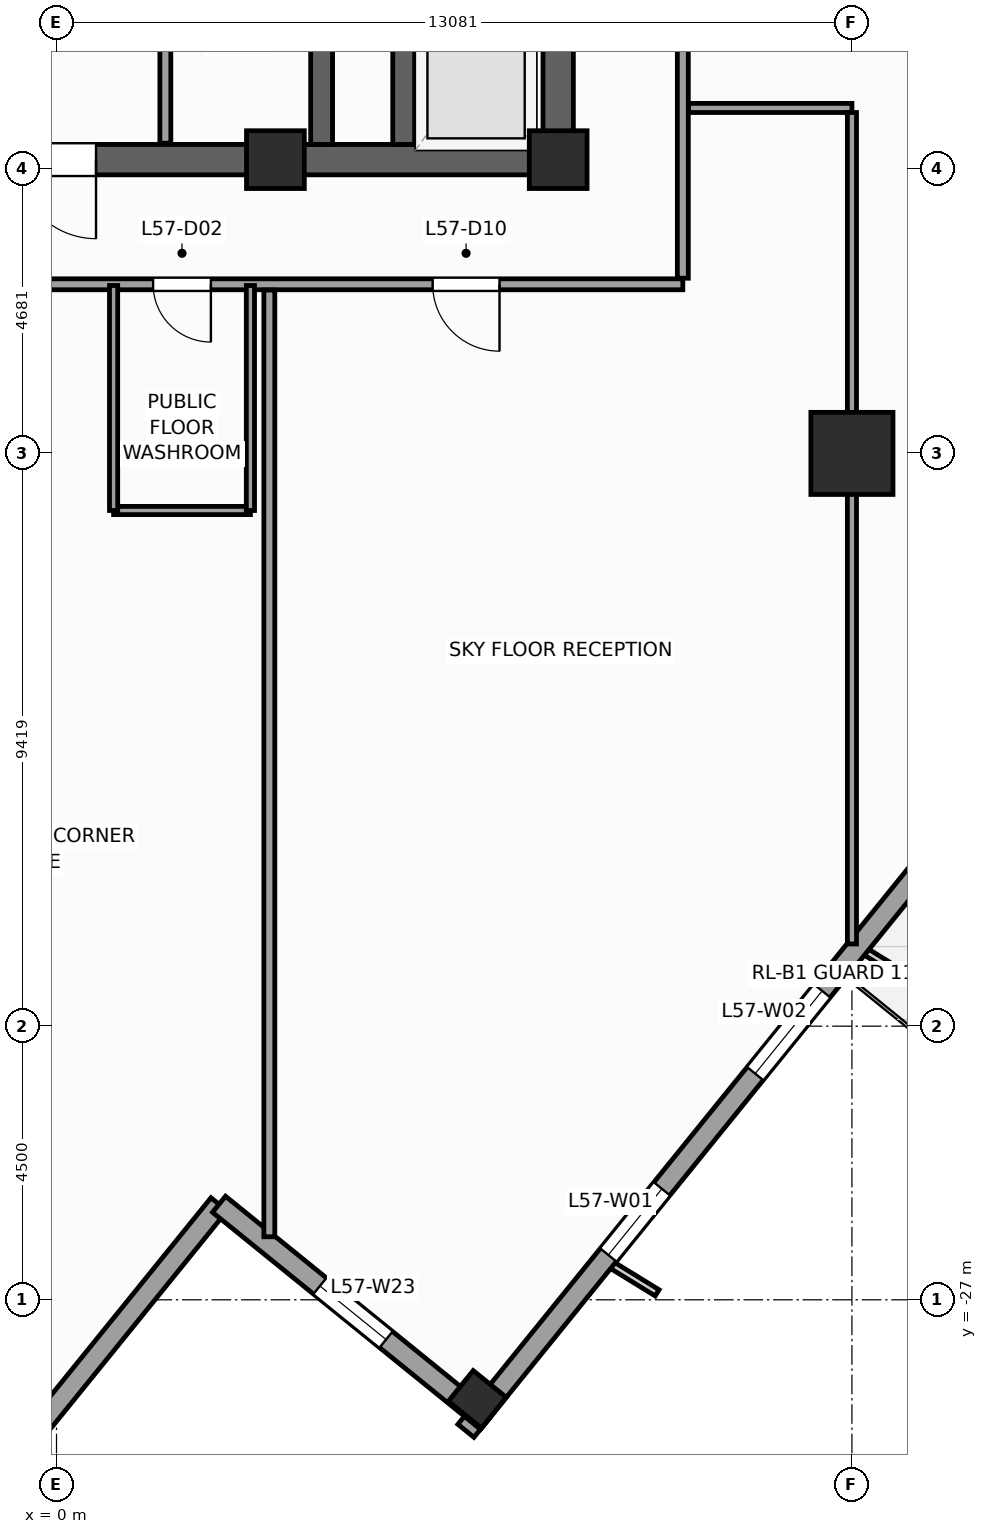
"""IFC4 building model, lengths in metres.
Left out: names, types, materials, properties, quantities, classifications, styles, units other than length and angle.
Written with IfcOpenShell. Run it as: python <this file> out.ifc"""

import sys

from ifc_helpers import new_model, si_unit, direction, frame, frame_2d, origin, origin_2d, place, context, subcontext, project, spatial, rectangle, extrude, source, transform, mapped, element, fill, save


model = new_model("IFC4")
c1 = context("Model", 3, precision=1e-05, world=origin(), true_north=direction((0.0, 1.0)))
c2 = subcontext(c1, "Body", "Model", "MODEL_VIEW")
j1 = project(units=[si_unit("LENGTHUNIT", "METRE"), si_unit("PLANEANGLEUNIT", "RADIAN")], contexts=[c1])
p1 = place(None, origin())
s1 = spatial("IfcSite", under=j1, at=p1, CompositionType="ELEMENT")
p2 = place(p1, origin())
s2 = spatial("IfcBuilding", under=s1, at=p2, CompositionType="ELEMENT")
p3 = place(p2, frame((0.0, 0.0, 236.8)))
s3 = spatial("IfcBuildingStorey", under=s2, at=p3, CompositionType="ELEMENT", Elevation=236.8)
p4 = place(p3, frame((-8.5, -8.25, 0.0), z_axis=(0.0, 0.0, 1.0), x_axis=(1.0, 0.0, 0.0)))
e1 = element("IfcWall", 1, at=p4, inside=s3, PredefinedType="SHEAR", context=c2, shape_type="SweptSolid", body=[
    extrude(rectangle(XDim=17.0, YDim=0.5, at=frame_2d((8.5, 0.0))), origin(), (0.0, 0.0, 1.0), 3.9),
])
p5 = place(p4, frame((7.85, 0.0, 0.0)))
e2 = element("IfcOpeningElement", 2, at=p5, cuts=e1, PredefinedType="OPENING", context=c2, shape_type="SweptSolid", body=[
    extrude(rectangle(XDim=1.3, YDim=2.2, at=frame_2d((0.65, 1.1))), frame((0.0, 0.26, 0.0), z_axis=(0.0, -1.0, 0.0), x_axis=(1.0, 0.0, 0.0)), (0.0, 0.0, 1.0), 0.52),
])
p6 = place(p3, frame((8.25, -8.0, 0.0), z_axis=(0.0, 0.0, 1.0), x_axis=(0.0, 1.0, 0.0)))
e3 = element("IfcWall", 3, at=p6, inside=s3, PredefinedType="SHEAR", context=c2, shape_type="SweptSolid", body=[
    extrude(rectangle(XDim=16.0, YDim=0.5, at=frame_2d((8.0, 0.0))), origin(), (0.0, 0.0, 1.0), 3.9),
])
p7 = place(p6, frame((4.69, 0.0, 0.0)))
e4 = element("IfcOpeningElement", 4, at=p7, cuts=e3, PredefinedType="OPENING", context=c2, shape_type="SweptSolid", body=[
    extrude(rectangle(XDim=1.3, YDim=2.2, at=frame_2d((0.65, 1.1))), frame((0.0, 0.26, 0.0), z_axis=(0.0, -1.0, 0.0), x_axis=(1.0, 0.0, 0.0)), (0.0, 0.0, 1.0), 0.52),
])
p8 = place(p3, frame((4.36, -8.0, 0.0), z_axis=(0.0, 0.0, 1.0), x_axis=(0.0, 1.0, 0.0)))
e5 = element("IfcWall", 5, at=p8, inside=s3, PredefinedType="SHEAR", context=c2, shape_type="SweptSolid", body=[
    extrude(rectangle(XDim=16.0, YDim=0.36, at=frame_2d((8.0, 0.0))), origin(), (0.0, 0.0, 1.0), 3.9),
])
p9 = place(p3, frame((5.71, -8.0, 0.0), z_axis=(0.0, 0.0, 1.0), x_axis=(0.0, 1.0, 0.0)))
e6 = element("IfcWall", 6, at=p9, inside=s3, PredefinedType="SHEAR", context=c2, shape_type="SweptSolid", body=[
    extrude(rectangle(XDim=2.54, YDim=0.36, at=frame_2d((1.27, 0.0))), origin(), (0.0, 0.0, 1.0), 3.9),
])
m1 = source(origin(), c2, "Body", "SweptSolid", [
    extrude(rectangle(XDim=0.95, YDim=0.95, at=origin_2d()), origin(), (0.0, 0.0, 1.0), 3.9),
])
for number, where, z_axis, x_axis in (
    (7, (8.25, -8.25, 0.0), (0.0, 0.0, 1.0), (1.0, 0.0, 0.0)),
    (8, (3.6, -8.25, 0.0), (0.0, 0.0, 1.0), (1.0, 0.0, 0.0)),
):
    element("IfcColumn", number, at=place(p3, frame(where, z_axis=z_axis, x_axis=x_axis)), inside=s3, PredefinedType="PILASTER", context=c2, shape_type="MappedRepresentation", body=[
        mapped(m1, transform((0.0, 0.0, 0.0), scale=1.0)),
    ])
m2 = source(origin(), c2, "Body", "SweptSolid", [
    extrude(rectangle(XDim=1.35, YDim=1.35, at=origin_2d()), origin(), (0.0, 0.0, 1.0), 3.9),
])
p10 = place(p3, frame((13.081, -13.081, 0.0), z_axis=(0.0, 0.0, 1.0), x_axis=(1.0, 0.0, 0.0)))
e9 = element("IfcColumn", 9, at=p10, inside=s3, PredefinedType="COLUMN", context=c2, shape_type="MappedRepresentation", body=[
    mapped(m2, transform((0.0, 0.0, 0.0), scale=1.0)),
])
m3 = source(origin(), c2, "Body", "SweptSolid", [
    extrude(rectangle(XDim=0.65, YDim=0.7, at=origin_2d()), origin(), (0.0, 0.0, 1.0), 3.9),
])
p11 = place(p3, frame((6.92, -28.637, 0.0), z_axis=(0.0, 0.0, 1.0), x_axis=(0.62932039105, 0.777145961457, 0.0)))
e10 = element("IfcColumn", 10, at=p11, inside=s3, PredefinedType="COLUMN", context=c2, shape_type="MappedRepresentation", body=[
    mapped(m3, transform((0.0, 0.0, 0.0), scale=1.0)),
])
p12 = place(p3, frame((6.733, -29.154, 0.0), z_axis=(0.0, 0.0, 1.0), x_axis=(0.629325378072, 0.77714192302, 0.0)))
e11 = element("IfcWall", 11, at=p12, inside=s3, PredefinedType="STANDARD", context=c2, shape_type="SweptSolid", body=[
    extrude(rectangle(XDim=36.84, YDim=0.34, at=frame_2d((18.42, 0.0))), origin(), (0.0, 0.0, 1.0), 2.96),
])
p13 = place(p12, frame((12.295, 0.0, 0.0)))
e12 = element("IfcOpeningElement", 12, at=p13, cuts=e11, PredefinedType="OPENING", context=c2, shape_type="SweptSolid", body=[
    extrude(rectangle(XDim=1.05, YDim=2.25, at=frame_2d((0.525, 1.125))), frame((0.0, 0.18, 0.0), z_axis=(0.0, -1.0, 0.0), x_axis=(1.0, 0.0, 0.0)), (0.0, 0.0, 1.0), 0.36),
])
p14 = place(p12, frame((3.721, 0.0, 0.48)))
e13 = element("IfcOpeningElement", 13, at=p14, cuts=e11, PredefinedType="OPENING", context=c2, shape_type="SweptSolid", body=[
    extrude(rectangle(XDim=1.4, YDim=2.4, at=frame_2d((0.7, 1.2))), frame((0.0, 0.18, 0.0), z_axis=(0.0, -1.0, 0.0), x_axis=(1.0, 0.0, 0.0)), (0.0, 0.0, 1.0), 0.36),
])
p15 = place(p12, frame((7.559, 0.0, 0.58)))
e14 = element("IfcOpeningElement", 14, at=p15, cuts=e11, PredefinedType="OPENING", context=c2, shape_type="SweptSolid", body=[
    extrude(rectangle(XDim=1.75, YDim=2.3, at=frame_2d((0.875, 1.15))), frame((0.0, 0.18, 0.0), z_axis=(0.0, -1.0, 0.0), x_axis=(1.0, 0.0, 0.0)), (0.0, 0.0, 1.0), 0.36),
])
p16 = place(p12, frame((16.058, 0.0, 0.58)))
e15 = element("IfcOpeningElement", 15, at=p16, cuts=e11, PredefinedType="OPENING", context=c2, shape_type="SweptSolid", body=[
    extrude(rectangle(XDim=1.75, YDim=2.3, at=frame_2d((0.875, 1.15))), frame((0.0, 0.18, 0.0), z_axis=(0.0, -1.0, 0.0), x_axis=(1.0, 0.0, 0.0)), (0.0, 0.0, 1.0), 0.36),
])
p17 = place(p12, frame((24.176, 0.0, 0.58)))
e16 = element("IfcOpeningElement", 16, at=p17, cuts=e11, PredefinedType="OPENING", context=c2, shape_type="SweptSolid", body=[
    extrude(rectangle(XDim=1.75, YDim=2.3, at=frame_2d((0.875, 1.15))), frame((0.0, 0.18, 0.0), z_axis=(0.0, -1.0, 0.0), x_axis=(1.0, 0.0, 0.0)), (0.0, 0.0, 1.0), 0.36),
])
p18 = place(p12, frame((30.982, 0.0, 0.48)))
e17 = element("IfcOpeningElement", 17, at=p18, cuts=e11, PredefinedType="OPENING", context=c2, shape_type="SweptSolid", body=[
    extrude(rectangle(XDim=1.4, YDim=2.4, at=frame_2d((0.7, 1.2))), frame((0.0, 0.18, 0.0), z_axis=(0.0, -1.0, 0.0), x_axis=(1.0, 0.0, 0.0)), (0.0, 0.0, 1.0), 0.36),
])
p19 = place(p3, frame((-0.789, -29.703, 0.0), z_axis=(0.0, 0.0, 1.0), x_axis=(0.629323365087, 0.77714355312, 0.0)))
e18 = element("IfcWall", 18, at=p19, inside=s3, PredefinedType="STANDARD", context=c2, shape_type="SweptSolid", body=[
    extrude(rectangle(XDim=5.5, YDim=0.34, at=frame_2d((2.75, 0.0))), origin(), (0.0, 0.0, 1.0), 3.66),
])
p20 = place(p3, frame((2.673, -25.429, 0.0), z_axis=(0.0, 0.0, 1.0), x_axis=(0.777162640055, -0.629299794138, 0.0)))
e19 = element("IfcWall", 19, at=p20, inside=s3, PredefinedType="STANDARD", context=c2, shape_type="SweptSolid", body=[
    extrude(rectangle(XDim=5.67, YDim=0.34, at=frame_2d((2.835, 0.0))), origin(), (0.0, 0.0, 1.0), 3.66),
])
p21 = place(p20, frame((2.135, 0.0, 0.48)))
e20 = element("IfcOpeningElement", 20, at=p21, cuts=e19, PredefinedType="OPENING", context=c2, shape_type="SweptSolid", body=[
    extrude(rectangle(XDim=1.4, YDim=2.4, at=frame_2d((0.7, 1.2))), frame((0.0, 0.18, 0.0), z_axis=(0.0, -1.0, 0.0), x_axis=(1.0, 0.0, 0.0)), (0.0, 0.0, 1.0), 0.36),
])
p22 = place(p3, frame((1.79, -7.98, 0.0), z_axis=(0.0, 0.0, 1.0), x_axis=(0.0, 1.0, 0.0)))
e21 = element("IfcWall", 21, at=p22, inside=s3, PredefinedType="PARTITIONING", context=c2, shape_type="SweptSolid", body=[
    extrude(rectangle(XDim=12.38, YDim=0.18, at=frame_2d((6.19, 0.0))), origin(), (0.0, 0.0, 1.0), 3.66),
])
p23 = place(p22, frame((8.8, 0.0, 0.0)))
e22 = element("IfcOpeningElement", 22, at=p23, cuts=e21, PredefinedType="OPENING", context=c2, shape_type="SweptSolid", body=[
    extrude(rectangle(XDim=1.1, YDim=2.2, at=frame_2d((0.55, 1.1))), frame((0.0, 0.1, 0.0), z_axis=(0.0, -1.0, 0.0), x_axis=(1.0, 0.0, 0.0)), (0.0, 0.0, 1.0), 0.2),
])
p24 = place(p22, frame((10.86, 0.0, 0.0)))
e23 = element("IfcOpeningElement", 23, at=p24, cuts=e21, PredefinedType="OPENING", context=c2, shape_type="SweptSolid", body=[
    extrude(rectangle(XDim=1.1, YDim=2.2, at=frame_2d((0.55, 1.1))), frame((0.0, 0.1, 0.0), z_axis=(0.0, -1.0, 0.0), x_axis=(1.0, 0.0, 0.0)), (0.0, 0.0, 1.0), 0.2),
])
p25 = place(p22, frame((3.5, 0.0, 0.0)))
e24 = element("IfcOpeningElement", 24, at=p25, cuts=e21, PredefinedType="OPENING", context=c2, shape_type="SweptSolid", body=[
    extrude(rectangle(XDim=1.15, YDim=2.25, at=frame_2d((0.575, 1.125))), frame((0.0, 0.1, 0.0), z_axis=(0.0, -1.0, 0.0), x_axis=(1.0, 0.0, 0.0)), (0.0, 0.0, 1.0), 0.2),
])
p26 = place(p3, frame((-11.4, -10.3, 0.0), z_axis=(0.0, 0.0, 1.0), x_axis=(1.0, 0.0, 0.0)))
e25 = element("IfcWall", 25, at=p26, inside=s3, PredefinedType="PARTITIONING", context=c2, shape_type="SweptSolid", body=[
    extrude(rectangle(XDim=21.7, YDim=0.18, at=frame_2d((10.85, 0.0))), origin(), (0.0, 0.0, 1.0), 3.66),
])
p27 = place(p26, frame((12.989, 0.0, 0.0)))
e26 = element("IfcOpeningElement", 26, at=p27, cuts=e25, PredefinedType="OPENING", context=c2, shape_type="SweptSolid", body=[
    extrude(rectangle(XDim=0.95, YDim=2.1, at=frame_2d((0.475, 1.05))), frame((0.0, 0.1, 0.0), z_axis=(0.0, -1.0, 0.0), x_axis=(1.0, 0.0, 0.0)), (0.0, 0.0, 1.0), 0.2),
])
p28 = place(p26, frame((17.585, 0.0, 0.0)))
e27 = element("IfcOpeningElement", 27, at=p28, cuts=e25, PredefinedType="OPENING", context=c2, shape_type="SweptSolid", body=[
    extrude(rectangle(XDim=1.1, YDim=2.2, at=frame_2d((0.55, 1.1))), frame((0.0, 0.1, 0.0), z_axis=(0.0, -1.0, 0.0), x_axis=(1.0, 0.0, 0.0)), (0.0, 0.0, 1.0), 0.2),
])
p29 = place(p26, frame((9.075, 0.0, 0.0)))
e28 = element("IfcOpeningElement", 28, at=p29, cuts=e25, PredefinedType="OPENING", context=c2, shape_type="SweptSolid", body=[
    extrude(rectangle(XDim=1.1, YDim=2.2, at=frame_2d((0.55, 1.1))), frame((0.0, 0.1, 0.0), z_axis=(0.0, -1.0, 0.0), x_axis=(1.0, 0.0, 0.0)), (0.0, 0.0, 1.0), 0.2),
])
p30 = place(p26, frame((3.724, 0.0, 0.0)))
e29 = element("IfcOpeningElement", 29, at=p30, cuts=e25, PredefinedType="OPENING", context=c2, shape_type="SweptSolid", body=[
    extrude(rectangle(XDim=1.1, YDim=2.2, at=frame_2d((0.55, 1.1))), frame((0.0, 0.1, 0.0), z_axis=(0.0, -1.0, 0.0), x_axis=(1.0, 0.0, 0.0)), (0.0, 0.0, 1.0), 0.2),
])
p31 = place(p3, frame((10.3, -10.2, 0.0), z_axis=(0.0, 0.0, 1.0), x_axis=(0.0, 1.0, 0.0)))
e30 = element("IfcWall", 30, at=p31, inside=s3, PredefinedType="PARTITIONING", context=c2, shape_type="SweptSolid", body=[
    extrude(rectangle(XDim=20.4, YDim=0.18, at=frame_2d((10.2, 0.0))), origin(), (0.0, 0.0, 1.0), 3.66),
])
p32 = place(p31, frame((14.95, 0.0, 0.0)))
e31 = element("IfcOpeningElement", 31, at=p32, cuts=e30, PredefinedType="OPENING", context=c2, shape_type="SweptSolid", body=[
    extrude(rectangle(XDim=1.1, YDim=2.2, at=frame_2d((0.55, 1.1))), frame((0.0, 0.1, 0.0), z_axis=(0.0, -1.0, 0.0), x_axis=(1.0, 0.0, 0.0)), (0.0, 0.0, 1.0), 0.2),
])
p33 = place(p31, frame((9.65, 0.0, 0.0)))
e32 = element("IfcOpeningElement", 32, at=p33, cuts=e30, PredefinedType="OPENING", context=c2, shape_type="SweptSolid", body=[
    extrude(rectangle(XDim=1.1, YDim=2.2, at=frame_2d((0.55, 1.1))), frame((0.0, 0.1, 0.0), z_axis=(0.0, -1.0, 0.0), x_axis=(1.0, 0.0, 0.0)), (0.0, 0.0, 1.0), 0.2),
])
p34 = place(p31, frame((4.35, 0.0, 0.0)))
e33 = element("IfcOpeningElement", 33, at=p34, cuts=e30, PredefinedType="OPENING", context=c2, shape_type="SweptSolid", body=[
    extrude(rectangle(XDim=1.1, YDim=2.2, at=frame_2d((0.55, 1.1))), frame((0.0, 0.1, 0.0), z_axis=(0.0, -1.0, 0.0), x_axis=(1.0, 0.0, 0.0)), (0.0, 0.0, 1.0), 0.2),
])
p35 = place(p3, frame((3.5, -10.395, 0.0), z_axis=(0.0, 0.0, 1.0), x_axis=(0.0, -1.0, 0.0)))
e34 = element("IfcWall", 34, at=p35, inside=s3, PredefinedType="PARTITIONING", context=c2, shape_type="SweptSolid", body=[
    extrude(rectangle(XDim=15.569, YDim=0.18, at=frame_2d((7.784, 0.0))), origin(), (0.0, 0.0, 1.0), 3.66),
])
p36 = place(p3, frame((10.395, -7.4, 0.0), z_axis=(0.0, 0.0, 1.0), x_axis=(1.0, 0.0, 0.0)))
e35 = element("IfcWall", 35, at=p36, inside=s3, PredefinedType="PARTITIONING", context=c2, shape_type="SweptSolid", body=[
    extrude(rectangle(XDim=2.686, YDim=0.15, at=frame_2d((1.343, 0.0))), origin(), (0.0, 0.0, 1.0), 3.66),
])
p37 = place(p3, frame((13.081, -7.475, 0.0), z_axis=(0.0, 0.0, 1.0), x_axis=(0.0, -1.0, 0.0)))
e36 = element("IfcWall", 36, at=p37, inside=s3, PredefinedType="PARTITIONING", context=c2, shape_type="SweptSolid", body=[
    extrude(rectangle(XDim=13.673, YDim=0.15, at=frame_2d((6.837, 0.0))), origin(), (0.0, 0.0, 1.0), 2.76),
])
p38 = place(p3, frame((0.939, -14.02, 0.0), z_axis=(0.0, 0.0, 1.0), x_axis=(1.0, 0.0, 0.0)))
e37 = element("IfcWall", 37, at=p38, inside=s3, PredefinedType="PARTITIONING", context=c2, shape_type="SweptSolid", body=[
    extrude(rectangle(XDim=2.25, YDim=0.135, at=frame_2d((1.125, 0.0))), origin(), (0.0, 0.0, 1.0), 3.66),
])
for number, where, z_axis, x_axis in (
    (38, (3.189, -14.02, 0.0), (0.0, 0.0, 1.0), (0.0, 1.0, 0.0)),
    (39, (0.939, -14.02, 0.0), (0.0, 0.0, 1.0), (0.0, 1.0, 0.0)),
):
    element("IfcWall", number, at=place(p3, frame(where, z_axis=z_axis, x_axis=x_axis)), inside=s3, PredefinedType="PARTITIONING", context=c2, shape_type="SweptSolid", body=[
        extrude(rectangle(XDim=3.7, YDim=0.135, at=frame_2d((1.85, 0.0))), origin(), (0.0, 0.0, 1.0), 3.66),
    ])
m4 = source(origin(), c2, "Body", "SweptSolid", [
    extrude(rectangle(XDim=1.4, YDim=2.4, at=frame_2d((0.7, 1.2))), frame((0.0, 0.03, 0.0), z_axis=(0.0, -1.0, 0.0), x_axis=(1.0, 0.0, 0.0)), (0.0, 0.0, 1.0), 0.06),
])
p39 = place(p14, origin())
e40 = element("IfcWindow", 40, at=p39, inside=s3, PartitioningType="SINGLE_PANEL", PredefinedType="WINDOW", context=c2, shape_type="MappedRepresentation", body=[
    mapped(m4, transform((0.0, 0.0, 0.0), scale=1.0)),
])
fill(e13, e40)
m5 = source(origin(), c2, "Body", "SweptSolid", [
    extrude(rectangle(XDim=1.75, YDim=2.3, at=frame_2d((0.875, 1.15))), frame((0.0, 0.03, 0.0), z_axis=(0.0, -1.0, 0.0), x_axis=(1.0, 0.0, 0.0)), (0.0, 0.0, 1.0), 0.06),
])
p40 = place(p15, origin())
e41 = element("IfcWindow", 41, at=p40, inside=s3, PartitioningType="SINGLE_PANEL", PredefinedType="WINDOW", context=c2, shape_type="MappedRepresentation", body=[
    mapped(m5, transform((0.0, 0.0, 0.0), scale=1.0)),
])
fill(e14, e41)
p41 = place(p21, origin())
e42 = element("IfcWindow", 42, at=p41, inside=s3, PartitioningType="SINGLE_PANEL", PredefinedType="WINDOW", context=c2, shape_type="MappedRepresentation", body=[
    mapped(m4, transform((0.0, 0.0, 0.0), scale=1.0)),
])
fill(e20, e42)
m6 = source(origin(), c2, "Body", "SweptSolid", [
    extrude(rectangle(XDim=1.3, YDim=2.2, at=frame_2d((0.65, 1.1))), frame((0.0, 0.025, 0.0), z_axis=(0.0, -1.0, 0.0), x_axis=(1.0, 0.0, 0.0)), (0.0, 0.0, 1.0), 0.05),
])
p42 = place(p5, frame((1.3, 0.0, 0.0), z_axis=(0.0, 0.0, 1.0), x_axis=(-1.0, 0.0, 0.0)))
e43 = element("IfcDoor", 43, at=p42, inside=s3, OperationType="SINGLE_SWING_RIGHT", PredefinedType="DOOR", context=c2, shape_type="MappedRepresentation", body=[
    mapped(m6, transform((0.0, 0.0, 0.0), scale=1.0)),
])
fill(e2, e43)
m7 = source(origin(), c2, "Body", "SweptSolid", [
    extrude(rectangle(XDim=0.95, YDim=2.1, at=frame_2d((0.475, 1.05))), frame((0.0, 0.025, 0.0), z_axis=(0.0, -1.0, 0.0), x_axis=(1.0, 0.0, 0.0)), (0.0, 0.0, 1.0), 0.05),
])
p43 = place(p27, frame((0.95, 0.0, 0.0), z_axis=(0.0, 0.0, 1.0), x_axis=(-1.0, 0.0, 0.0)))
e44 = element("IfcDoor", 44, at=p43, inside=s3, OperationType="SINGLE_SWING_RIGHT", PredefinedType="DOOR", context=c2, shape_type="MappedRepresentation", body=[
    mapped(m7, transform((0.0, 0.0, 0.0), scale=1.0)),
])
fill(e26, e44)
m8 = source(origin(), c2, "Body", "SweptSolid", [
    extrude(rectangle(XDim=1.1, YDim=2.2, at=frame_2d((0.55, 1.1))), frame((0.0, 0.025, 0.0), z_axis=(0.0, -1.0, 0.0), x_axis=(1.0, 0.0, 0.0)), (0.0, 0.0, 1.0), 0.05),
])
p44 = place(p28, frame((1.1, 0.0, 0.0), z_axis=(0.0, 0.0, 1.0), x_axis=(-1.0, 0.0, 0.0)))
e45 = element("IfcDoor", 45, at=p44, inside=s3, OperationType="SINGLE_SWING_RIGHT", PredefinedType="DOOR", context=c2, shape_type="MappedRepresentation", body=[
    mapped(m8, transform((0.0, 0.0, 0.0), scale=1.0)),
])
fill(e27, e45)
save(model, sys.argv[1])
